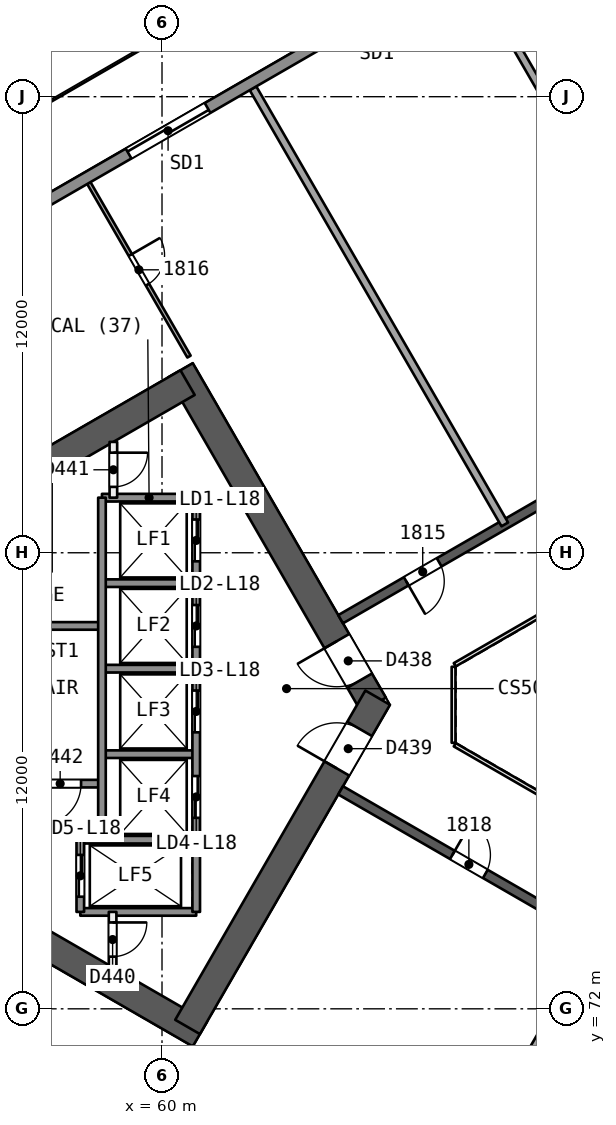
"""IFC4 building model, lengths in metres.
Left out: names, types, materials, properties, quantities, classifications, styles, units other than length and angle.
Written with IfcOpenShell. Run it as: python <this file> out.ifc"""

import sys

from ifc_helpers import new_model, si_unit, direction, frame, frame_2d, origin, place, context, subcontext, project, spatial, rectangle, extrude, element, fill, save


model = new_model("IFC4")
c1 = context("Model", 3, precision=1e-05, world=origin(), true_north=direction((0.0, 1.0)))
c2 = subcontext(c1, "Body", "Model", "MODEL_VIEW")
j1 = project(units=[si_unit("LENGTHUNIT", "METRE"), si_unit("PLANEANGLEUNIT", "RADIAN")], contexts=[c1])
p1 = place(None, origin())
s1 = spatial("IfcSite", under=j1, at=p1, CompositionType="ELEMENT")
p2 = place(p1, origin())
s2 = spatial("IfcBuilding", under=s1, at=p2, CompositionType="ELEMENT")
p3 = place(p2, frame((0.0, 0.0, 79.5)))
s3 = spatial("IfcBuildingStorey", under=s2, at=p3, CompositionType="ELEMENT", Elevation=79.5)
p4 = place(p3, frame((65.567, 80.0, 0.0), z_axis=(0.0, 0.0, 1.0), x_axis=(-0.499988615364, 0.866031976607, 0.0)))
e1 = element("IfcWall", 1, at=p4, inside=s3, PredefinedType="SHEAR", context=c2, shape_type="SweptSolid", body=[
    extrude(rectangle(XDim=10.163, YDim=0.75, at=frame_2d((5.082, 0.0))), origin(), (0.0, 0.0, 1.0), 3.7),
])
p5 = place(p4, frame((0.733, 0.0, 0.0)))
e2 = element("IfcOpeningElement", 2, at=p5, cuts=e1, PredefinedType="OPENING", context=c2, shape_type="SweptSolid", body=[
    extrude(rectangle(XDim=1.2, YDim=2.1, at=frame_2d((0.6, 1.05))), frame((0.0, 0.385, 0.0), z_axis=(0.0, -1.0, 0.0), x_axis=(1.0, 0.0, 0.0)), (0.0, 0.0, 1.0), 0.771),
])
p6 = place(p3, frame((60.673, 88.477, 0.0), z_axis=(0.0, 0.0, 1.0), x_axis=(-0.8660248072, -0.500001033313, 0.0)))
e3 = element("IfcWall", 3, at=p6, inside=s3, PredefinedType="SHEAR", context=c2, shape_type="SweptSolid", body=[
    extrude(rectangle(XDim=13.958, YDim=0.75, at=frame_2d((6.979, 0.0))), origin(), (0.0, 0.0, 1.0), 3.7),
])
p7 = place(p3, frame((48.772, 78.394, 0.0), z_axis=(0.0, 0.0, 1.0), x_axis=(0.866028339916, -0.499994914436, 0.0)))
e4 = element("IfcWall", 4, at=p7, inside=s3, PredefinedType="SHEAR", context=c2, shape_type="SweptSolid", body=[
    extrude(rectangle(XDim=14.117, YDim=0.75, at=frame_2d((7.059, 0.0))), origin(), (0.0, 0.0, 1.0), 3.7),
])
p8 = place(p3, frame((60.673, 71.523, 0.0), z_axis=(0.0, 0.0, 1.0), x_axis=(0.499997052475, 0.866027105532, 0.0)))
e5 = element("IfcWall", 5, at=p8, inside=s3, PredefinedType="SHEAR", context=c2, shape_type="SweptSolid", body=[
    extrude(rectangle(XDim=10.005, YDim=0.75, at=frame_2d((5.002, 0.0))), origin(), (0.0, 0.0, 1.0), 3.7),
])
p9 = place(p8, frame((7.855, 0.0, 0.0)))
e6 = element("IfcOpeningElement", 6, at=p9, cuts=e5, PredefinedType="OPENING", context=c2, shape_type="SweptSolid", body=[
    extrude(rectangle(XDim=1.2, YDim=2.1, at=frame_2d((0.6, 1.05))), frame((0.0, 0.385, 0.0), z_axis=(0.0, -1.0, 0.0), x_axis=(1.0, 0.0, 0.0)), (0.0, 0.0, 1.0), 0.771),
])
p10 = place(p3, frame((78.2, 90.046, 0.0), z_axis=(0.0, 0.0, 1.0), x_axis=(-0.866026492143, -0.499998114903, 0.0)))
e7 = element("IfcWall", 7, at=p10, inside=s3, PredefinedType="SHEAR", context=c2, shape_type="SweptSolid", body=[
    extrude(rectangle(XDim=15.588, YDim=0.25, at=frame_2d((7.794, 0.0))), origin(), (0.0, 0.0, 1.0), 3.2),
])
p11 = place(p10, frame((1.527, 0.0, 0.0)))
e8 = element("IfcOpeningElement", 8, at=p11, cuts=e7, PredefinedType="OPENING", context=c2, shape_type="SweptSolid", body=[
    extrude(rectangle(XDim=1.0, YDim=2.1, at=frame_2d((0.5, 1.05))), frame((0.0, 0.135, 0.0), z_axis=(0.0, -1.0, 0.0), x_axis=(1.0, 0.0, 0.0)), (0.0, 0.0, 1.0), 0.271),
])
p12 = place(p10, frame((8.227, 0.0, 0.0)))
e9 = element("IfcOpeningElement", 9, at=p12, cuts=e7, PredefinedType="OPENING", context=c2, shape_type="SweptSolid", body=[
    extrude(rectangle(XDim=1.1, YDim=2.1, at=frame_2d((0.55, 1.05))), frame((0.0, 0.135, 0.0), z_axis=(0.0, -1.0, 0.0), x_axis=(1.0, 0.0, 0.0)), (0.0, 0.0, 1.0), 0.271),
])
p13 = place(p10, frame((12.594, 0.0, 0.0)))
e10 = element("IfcOpeningElement", 10, at=p13, cuts=e7, PredefinedType="OPENING", context=c2, shape_type="SweptSolid", body=[
    extrude(rectangle(XDim=1.0, YDim=2.1, at=frame_2d((0.5, 1.05))), frame((0.0, 0.135, 0.0), z_axis=(0.0, -1.0, 0.0), x_axis=(1.0, 0.0, 0.0)), (0.0, 0.0, 1.0), 0.271),
])
p14 = place(p3, frame((64.7, 77.748, 0.0), z_axis=(0.0, 0.0, 1.0), x_axis=(0.866026492143, -0.499998114903, 0.0)))
e11 = element("IfcWall", 11, at=p14, inside=s3, PredefinedType="SHEAR", context=c2, shape_type="SweptSolid", body=[
    extrude(rectangle(XDim=15.588, YDim=0.25, at=frame_2d((7.794, 0.0))), origin(), (0.0, 0.0, 1.0), 3.2),
])
p15 = place(p14, frame((3.397, 0.0, 0.0)))
e12 = element("IfcOpeningElement", 12, at=p15, cuts=e11, PredefinedType="OPENING", context=c2, shape_type="SweptSolid", body=[
    extrude(rectangle(XDim=1.0, YDim=2.1, at=frame_2d((0.5, 1.05))), frame((0.0, 0.135, 0.0), z_axis=(0.0, -1.0, 0.0), x_axis=(1.0, 0.0, 0.0)), (0.0, 0.0, 1.0), 0.271),
])
p16 = place(p14, frame((9.091, 0.0, 0.0)))
e13 = element("IfcOpeningElement", 13, at=p16, cuts=e11, PredefinedType="OPENING", context=c2, shape_type="SweptSolid", body=[
    extrude(rectangle(XDim=1.0, YDim=2.1, at=frame_2d((0.5, 1.05))), frame((0.0, 0.135, 0.0), z_axis=(0.0, -1.0, 0.0), x_axis=(1.0, 0.0, 0.0)), (0.0, 0.0, 1.0), 0.271),
])
for number, where, z_axis, x_axis in (
    (14, (68.064, 99.496, 0.0), (0.0, 0.0, 1.0), (0.5, -0.866, 0.0)),
    (15, (62.394, 96.222, 0.0), (0.0, 0.0, 1.0), (0.5, -0.866, 0.0)),
):
    element("IfcWall", number, at=place(p3, frame(where, z_axis=z_axis, x_axis=x_axis)), inside=s3, PredefinedType="PARTITIONING", context=c2, shape_type="SweptSolid", body=[
        extrude(rectangle(XDim=13.252, YDim=0.2, at=frame_2d((6.626, 0.0))), origin(), (0.0, 0.0, 1.0), 3.2),
    ])
p17 = place(p3, frame((58.074, 93.728, 0.0), z_axis=(0.0, 0.0, 1.0), x_axis=(0.499973627007, -0.866040629704, 0.0)))
e16 = element("IfcWall", 16, at=p17, inside=s3, PredefinedType="PARTITIONING", context=c2, shape_type="SweptSolid", body=[
    extrude(rectangle(XDim=5.273, YDim=0.1, at=frame_2d((2.636, 0.0))), origin(), (0.0, 0.0, 1.0), 3.2),
])
p18 = place(p17, frame((2.186, 0.0, 0.0)))
e17 = element("IfcOpeningElement", 17, at=p18, cuts=e16, PredefinedType="OPENING", context=c2, shape_type="SweptSolid", body=[
    extrude(rectangle(XDim=0.9, YDim=2.1, at=frame_2d((0.45, 1.05))), frame((0.0, 0.061, 0.0), z_axis=(0.0, -1.0, 0.0), x_axis=(1.0, 0.0, 0.0)), (0.0, 0.0, 1.0), 0.121),
])
p19 = place(p3, frame((64.824, 62.375, 0.0), z_axis=(0.0, 0.0, 1.0), x_axis=(0.499993034499, 0.866029425281, 0.0)))
e18 = element("IfcWall", 18, at=p19, inside=s3, PredefinedType="PARTITIONING", context=c2, shape_type="SweptSolid", body=[
    extrude(rectangle(XDim=13.252, YDim=0.2, at=frame_2d((6.626, 0.0))), origin(), (0.0, 0.0, 1.0), 3.2),
])
p20 = place(p3, frame((39.223, 83.016, 0.0), z_axis=(0.0, 0.0, 1.0), x_axis=(0.86602468924, 0.500001237625, 0.0)))
e19 = element("IfcWall", 19, at=p20, inside=s3, PredefinedType="SOLIDWALL", context=c2, shape_type="SweptSolid", body=[
    extrude(rectangle(XDim=58.951, YDim=0.3, at=frame_2d((29.476, 0.0))), origin(), (0.0, 0.0, 1.0), 3.2),
])
p21 = place(p20, frame((28.743, 0.0, 0.0)))
e20 = element("IfcOpeningElement", 20, at=p21, cuts=e19, PredefinedType="OPENING", context=c2, shape_type="SweptSolid", body=[
    extrude(rectangle(XDim=2.4, YDim=2.4, at=frame_2d((1.2, 1.2))), frame((0.0, 0.161, 0.0), z_axis=(0.0, -1.0, 0.0), x_axis=(1.0, 0.0, 0.0)), (0.0, 0.0, 1.0), 0.321),
])
p22 = place(p20, frame((34.043, 0.0, 0.0)))
e21 = element("IfcOpeningElement", 21, at=p22, cuts=e19, PredefinedType="OPENING", context=c2, shape_type="SweptSolid", body=[
    extrude(rectangle(XDim=2.4, YDim=2.4, at=frame_2d((1.2, 1.2))), frame((0.0, 0.161, 0.0), z_axis=(0.0, -1.0, 0.0), x_axis=(1.0, 0.0, 0.0)), (0.0, 0.0, 1.0), 0.321),
])
p23 = place(p20, frame((45.739, 0.0, 0.0)))
e22 = element("IfcOpeningElement", 22, at=p23, cuts=e19, PredefinedType="OPENING", context=c2, shape_type="SweptSolid", body=[
    extrude(rectangle(XDim=2.4, YDim=2.4, at=frame_2d((1.2, 1.2))), frame((0.0, 0.161, 0.0), z_axis=(0.0, -1.0, 0.0), x_axis=(1.0, 0.0, 0.0)), (0.0, 0.0, 1.0), 0.321),
])
p24 = place(p20, frame((22.976, 0.0, 0.0)))
e23 = element("IfcOpeningElement", 23, at=p24, cuts=e19, PredefinedType="OPENING", context=c2, shape_type="SweptSolid", body=[
    extrude(rectangle(XDim=2.4, YDim=2.4, at=frame_2d((1.2, 1.2))), frame((0.0, 0.161, 0.0), z_axis=(0.0, -1.0, 0.0), x_axis=(1.0, 0.0, 0.0)), (0.0, 0.0, 1.0), 0.321),
])
p25 = place(p20, frame((10.773, 0.0, 0.0)))
e24 = element("IfcOpeningElement", 24, at=p25, cuts=e19, PredefinedType="OPENING", context=c2, shape_type="SweptSolid", body=[
    extrude(rectangle(XDim=2.4, YDim=2.4, at=frame_2d((1.2, 1.2))), frame((0.0, 0.161, 0.0), z_axis=(0.0, -1.0, 0.0), x_axis=(1.0, 0.0, 0.0)), (0.0, 0.0, 1.0), 0.321),
])
p26 = place(p3, frame((90.276, 47.508, 0.0), z_axis=(0.0, 0.0, 1.0), x_axis=(-0.86602468924, 0.500001237625, 0.0)))
e25 = element("IfcWall", 25, at=p26, inside=s3, PredefinedType="SOLIDWALL", context=c2, shape_type="SweptSolid", body=[
    extrude(rectangle(XDim=58.951, YDim=0.3, at=frame_2d((29.476, 0.0))), origin(), (0.0, 0.0, 1.0), 3.2),
])
p27 = place(p26, frame((32.173, 0.0, 0.0)))
e26 = element("IfcOpeningElement", 26, at=p27, cuts=e25, PredefinedType="OPENING", context=c2, shape_type="SweptSolid", body=[
    extrude(rectangle(XDim=2.4, YDim=2.4, at=frame_2d((1.2, 1.2))), frame((0.0, 0.161, 0.0), z_axis=(0.0, -1.0, 0.0), x_axis=(1.0, 0.0, 0.0)), (0.0, 0.0, 1.0), 0.321),
])
p28 = place(p26, frame((45.739, 0.0, 0.0)))
e27 = element("IfcOpeningElement", 27, at=p28, cuts=e25, PredefinedType="OPENING", context=c2, shape_type="SweptSolid", body=[
    extrude(rectangle(XDim=2.4, YDim=2.4, at=frame_2d((1.2, 1.2))), frame((0.0, 0.161, 0.0), z_axis=(0.0, -1.0, 0.0), x_axis=(1.0, 0.0, 0.0)), (0.0, 0.0, 1.0), 0.321),
])
p29 = place(p26, frame((13.495, 0.0, 0.0)))
e28 = element("IfcOpeningElement", 28, at=p29, cuts=e25, PredefinedType="OPENING", context=c2, shape_type="SweptSolid", body=[
    extrude(rectangle(XDim=2.4, YDim=2.4, at=frame_2d((1.2, 1.2))), frame((0.0, 0.161, 0.0), z_axis=(0.0, -1.0, 0.0), x_axis=(1.0, 0.0, 0.0)), (0.0, 0.0, 1.0), 0.321),
])
for number, where, z_axis, x_axis in (
    (29, (60.9, 85.45, 0.0), (0.0, 0.0, 1.0), (-1.0, 0.0, 0.0)),
    (30, (60.9, 83.2, 0.0), (0.0, 0.0, 1.0), (-1.0, 0.0, 0.0)),
):
    element("IfcWall", number, at=place(p3, frame(where, z_axis=z_axis, x_axis=x_axis)), inside=s3, PredefinedType="SOLIDWALL", context=c2, shape_type="SweptSolid", body=[
        extrude(rectangle(XDim=2.48, YDim=0.2, at=frame_2d((1.24, 0.0))), origin(), (0.0, 0.0, 1.0), 3.2),
    ])
p30 = place(p3, frame((58.42, 82.075, 0.0), z_axis=(0.0, 0.0, 1.0), x_axis=(-1.0, 0.0, 0.0)))
e31 = element("IfcWall", 31, at=p30, inside=s3, PredefinedType="SOLIDWALL", context=c2, shape_type="SweptSolid", body=[
    extrude(rectangle(XDim=7.7, YDim=0.2, at=frame_2d((3.85, 0.0))), origin(), (0.0, 0.0, 1.0), 3.2),
])
for number, where, z_axis, x_axis in (
    (32, (60.9, 80.95, 0.0), (0.0, 0.0, 1.0), (-1.0, 0.0, 0.0)),
    (33, (60.9, 78.7, 0.0), (0.0, 0.0, 1.0), (-1.0, 0.0, 0.0)),
):
    element("IfcWall", number, at=place(p3, frame(where, z_axis=z_axis, x_axis=x_axis)), inside=s3, PredefinedType="SOLIDWALL", context=c2, shape_type="SweptSolid", body=[
        extrude(rectangle(XDim=2.48, YDim=0.2, at=frame_2d((1.24, 0.0))), origin(), (0.0, 0.0, 1.0), 3.2),
    ])
p31 = place(p3, frame((58.42, 77.925, 0.0), z_axis=(0.0, 0.0, 1.0), x_axis=(-1.0, 0.0, 0.0)))
e34 = element("IfcWall", 34, at=p31, inside=s3, PredefinedType="SOLIDWALL", context=c2, shape_type="SweptSolid", body=[
    extrude(rectangle(XDim=7.7, YDim=0.2, at=frame_2d((3.85, 0.0))), origin(), (0.0, 0.0, 1.0), 3.2),
])
p32 = place(p31, frame((0.55, 0.0, 0.0)))
e35 = element("IfcOpeningElement", 35, at=p32, cuts=e34, PredefinedType="OPENING", context=c2, shape_type="SweptSolid", body=[
    extrude(rectangle(XDim=1.1, YDim=2.1, at=frame_2d((0.55, 1.05))), frame((0.0, 0.11, 0.0), z_axis=(0.0, -1.0, 0.0), x_axis=(1.0, 0.0, 0.0)), (0.0, 0.0, 1.0), 0.221),
])
for number, where, z_axis, x_axis in (
    (36, (60.9, 76.45, 0.0), (0.0, 0.0, 1.0), (-1.0, 0.0, 0.0)),
    (37, (60.9, 74.55, 0.0), (0.0, 0.0, 1.0), (-1.0, 0.0, 0.0)),
):
    element("IfcWall", number, at=place(p3, frame(where, z_axis=z_axis, x_axis=x_axis)), inside=s3, PredefinedType="SOLIDWALL", context=c2, shape_type="SweptSolid", body=[
        extrude(rectangle(XDim=3.05, YDim=0.2, at=frame_2d((1.525, 0.0))), origin(), (0.0, 0.0, 1.0), 3.2),
    ])
p33 = place(p3, frame((60.9, 85.45, 0.0), z_axis=(0.0, 0.0, 1.0), x_axis=(0.0, -1.0, 0.0)))
e38 = element("IfcWall", 38, at=p33, inside=s3, PredefinedType="SOLIDWALL", context=c2, shape_type="SweptSolid", body=[
    extrude(rectangle(XDim=10.9, YDim=0.2, at=frame_2d((5.45, 0.0))), origin(), (0.0, 0.0, 1.0), 3.2),
])
p34 = place(p33, frame((0.575, 0.0, 0.0)))
e39 = element("IfcOpeningElement", 39, at=p34, cuts=e38, PredefinedType="OPENING", context=c2, shape_type="SweptSolid", body=[
    extrude(rectangle(XDim=1.1, YDim=2.1, at=frame_2d((0.55, 1.05))), frame((0.0, 0.11, 0.0), z_axis=(0.0, -1.0, 0.0), x_axis=(1.0, 0.0, 0.0)), (0.0, 0.0, 1.0), 0.221),
])
p35 = place(p33, frame((2.825, 0.0, 0.0)))
e40 = element("IfcOpeningElement", 40, at=p35, cuts=e38, PredefinedType="OPENING", context=c2, shape_type="SweptSolid", body=[
    extrude(rectangle(XDim=1.1, YDim=2.1, at=frame_2d((0.55, 1.05))), frame((0.0, 0.11, 0.0), z_axis=(0.0, -1.0, 0.0), x_axis=(1.0, 0.0, 0.0)), (0.0, 0.0, 1.0), 0.221),
])
p36 = place(p33, frame((5.075, 0.0, 0.0)))
e41 = element("IfcOpeningElement", 41, at=p36, cuts=e38, PredefinedType="OPENING", context=c2, shape_type="SweptSolid", body=[
    extrude(rectangle(XDim=1.1, YDim=2.1, at=frame_2d((0.55, 1.05))), frame((0.0, 0.11, 0.0), z_axis=(0.0, -1.0, 0.0), x_axis=(1.0, 0.0, 0.0)), (0.0, 0.0, 1.0), 0.221),
])
p37 = place(p33, frame((7.325, 0.0, 0.0)))
e42 = element("IfcOpeningElement", 42, at=p37, cuts=e38, PredefinedType="OPENING", context=c2, shape_type="SweptSolid", body=[
    extrude(rectangle(XDim=1.1, YDim=2.1, at=frame_2d((0.55, 1.05))), frame((0.0, 0.11, 0.0), z_axis=(0.0, -1.0, 0.0), x_axis=(1.0, 0.0, 0.0)), (0.0, 0.0, 1.0), 0.221),
])
p38 = place(p3, frame((58.72, 86.917, 0.0), z_axis=(0.0, 0.0, 1.0), x_axis=(0.0, -1.0, 0.0)))
e43 = element("IfcWall", 43, at=p38, inside=s3, PredefinedType="PARTITIONING", context=c2, shape_type="SweptSolid", body=[
    extrude(rectangle(XDim=1.467, YDim=0.2, at=frame_2d((0.733, 0.0))), origin(), (0.0, 0.0, 1.0), 3.2),
])
p39 = place(p38, frame((0.283, 0.0, 0.0)))
e44 = element("IfcOpeningElement", 44, at=p39, cuts=e43, PredefinedType="OPENING", context=c2, shape_type="SweptSolid", body=[
    extrude(rectangle(XDim=0.9, YDim=2.1, at=frame_2d((0.45, 1.05))), frame((0.0, 0.11, 0.0), z_axis=(0.0, -1.0, 0.0), x_axis=(1.0, 0.0, 0.0)), (0.0, 0.0, 1.0), 0.221),
])
p40 = place(p3, frame((58.7, 74.55, 0.0), z_axis=(0.0, 0.0, 1.0), x_axis=(0.0, -1.0, 0.0)))
e45 = element("IfcWall", 45, at=p40, inside=s3, PredefinedType="PARTITIONING", context=c2, shape_type="SweptSolid", body=[
    extrude(rectangle(XDim=1.455, YDim=0.2, at=frame_2d((0.728, 0.0))), origin(), (0.0, 0.0, 1.0), 3.2),
])
p41 = place(p40, frame((0.278, 0.0, 0.0)))
e46 = element("IfcOpeningElement", 46, at=p41, cuts=e45, PredefinedType="OPENING", context=c2, shape_type="SweptSolid", body=[
    extrude(rectangle(XDim=0.9, YDim=2.1, at=frame_2d((0.45, 1.05))), frame((0.0, 0.11, 0.0), z_axis=(0.0, -1.0, 0.0), x_axis=(1.0, 0.0, 0.0)), (0.0, 0.0, 1.0), 0.221),
])
p42 = place(p3, frame((58.42, 85.45, 0.0), z_axis=(0.0, 0.0, 1.0), x_axis=(0.0, -1.0, 0.0)))
e47 = element("IfcWall", 47, at=p42, inside=s3, PredefinedType="SOLIDWALL", context=c2, shape_type="SweptSolid", body=[
    extrude(rectangle(XDim=9.0, YDim=0.2, at=frame_2d((4.5, 0.0))), origin(), (0.0, 0.0, 1.0), 3.2),
])
p43 = place(p3, frame((57.85, 76.45, 0.0), z_axis=(0.0, 0.0, 1.0), x_axis=(0.0, -1.0, 0.0)))
e48 = element("IfcWall", 48, at=p43, inside=s3, PredefinedType="SOLIDWALL", context=c2, shape_type="SweptSolid", body=[
    extrude(rectangle(XDim=1.9, YDim=0.2, at=frame_2d((0.95, 0.0))), origin(), (0.0, 0.0, 1.0), 3.2),
])
p44 = place(p43, frame((0.4, 0.0, 0.0)))
e49 = element("IfcOpeningElement", 49, at=p44, cuts=e48, PredefinedType="OPENING", context=c2, shape_type="SweptSolid", body=[
    extrude(rectangle(XDim=1.1, YDim=2.1, at=frame_2d((0.55, 1.05))), frame((0.0, 0.11, 0.0), z_axis=(0.0, -1.0, 0.0), x_axis=(1.0, 0.0, 0.0)), (0.0, 0.0, 1.0), 0.221),
])
p45 = place(p3, frame((77.738, 86.846, 0.0), z_axis=(0.0, 0.0, 1.0), x_axis=(-0.866026658274, -0.499997827154, 0.0)))
e50 = element("IfcWall", 50, at=p45, inside=s3, PredefinedType="PARTITIONING", context=c2, shape_type="SweptSolid", body=[
    extrude(rectangle(XDim=11.588, YDim=0.1, at=frame_2d((5.794, 0.0))), origin(), (0.0, 0.0, 1.0), 3.2),
])
p46 = place(p3, frame((67.672, 81.0, 0.0), z_axis=(0.0, 0.0, 1.0), x_axis=(0.0, -1.0, 0.0)))
e51 = element("IfcWall", 51, at=p46, inside=s3, PredefinedType="PARTITIONING", context=c2, shape_type="SweptSolid", body=[
    extrude(rectangle(XDim=2.0, YDim=0.1, at=frame_2d((1.0, 0.0))), origin(), (0.0, 0.0, 1.0), 3.2),
])
p47 = place(p3, frame((67.702, 78.948, 0.0), z_axis=(0.0, 0.0, 1.0), x_axis=(0.866026658274, -0.499997827154, 0.0)))
e52 = element("IfcWall", 52, at=p47, inside=s3, PredefinedType="PARTITIONING", context=c2, shape_type="SweptSolid", body=[
    extrude(rectangle(XDim=11.588, YDim=0.1, at=frame_2d((5.794, 0.0))), origin(), (0.0, 0.0, 1.0), 3.2),
])
p48 = place(p13, origin())
e53 = element("IfcDoor", 53, at=p48, inside=s3, OperationType="SINGLE_SWING_RIGHT", PredefinedType="NOTDEFINED", context=c2, shape_type="SweptSolid", body=[
    extrude(rectangle(XDim=1.0, YDim=2.1, at=frame_2d((0.5, 1.05))), frame((0.0, 0.025, 0.0), z_axis=(0.0, -1.0, 0.0), x_axis=(1.0, 0.0, 0.0)), (0.0, 0.0, 1.0), 0.05),
])
fill(e10, e53)
p49 = place(p18, origin())
e54 = element("IfcDoor", 54, at=p49, inside=s3, OperationType="SINGLE_SWING_LEFT", PredefinedType="NOTDEFINED", context=c2, shape_type="SweptSolid", body=[
    extrude(rectangle(XDim=0.9, YDim=2.1, at=frame_2d((0.45, 1.05))), frame((0.0, 0.025, 0.0), z_axis=(0.0, -1.0, 0.0), x_axis=(1.0, 0.0, 0.0)), (0.0, 0.0, 1.0), 0.05),
])
fill(e17, e54)
p50 = place(p15, origin())
e55 = element("IfcDoor", 55, at=p50, inside=s3, OperationType="SINGLE_SWING_LEFT", PredefinedType="NOTDEFINED", context=c2, shape_type="SweptSolid", body=[
    extrude(rectangle(XDim=1.0, YDim=2.1, at=frame_2d((0.5, 1.05))), frame((0.0, 0.025, 0.0), z_axis=(0.0, -1.0, 0.0), x_axis=(1.0, 0.0, 0.0)), (0.0, 0.0, 1.0), 0.05),
])
fill(e12, e55)
p51 = place(p24, origin())
e56 = element("IfcDoor", 56, at=p51, inside=s3, OperationType="SLIDING_TO_RIGHT", PredefinedType="NOTDEFINED", context=c2, shape_type="SweptSolid", body=[
    extrude(rectangle(XDim=2.4, YDim=2.4, at=frame_2d((1.2, 1.2))), frame((0.0, 0.025, 0.0), z_axis=(0.0, -1.0, 0.0), x_axis=(1.0, 0.0, 0.0)), (0.0, 0.0, 1.0), 0.05),
])
fill(e23, e56)
p52 = place(p5, origin())
e57 = element("IfcDoor", 57, at=p52, inside=s3, OperationType="SINGLE_SWING_RIGHT", PredefinedType="NOTDEFINED", context=c2, shape_type="SweptSolid", body=[
    extrude(rectangle(XDim=1.2, YDim=2.1, at=frame_2d((0.6, 1.05))), frame((0.0, 0.025, 0.0), z_axis=(0.0, -1.0, 0.0), x_axis=(1.0, 0.0, 0.0)), (0.0, 0.0, 1.0), 0.05),
])
fill(e2, e57)
p53 = place(p9, origin())
e58 = element("IfcDoor", 58, at=p53, inside=s3, OperationType="SINGLE_SWING_LEFT", PredefinedType="NOTDEFINED", context=c2, shape_type="SweptSolid", body=[
    extrude(rectangle(XDim=1.2, YDim=2.1, at=frame_2d((0.6, 1.05))), frame((0.0, 0.025, 0.0), z_axis=(0.0, -1.0, 0.0), x_axis=(1.0, 0.0, 0.0)), (0.0, 0.0, 1.0), 0.05),
])
fill(e6, e58)
p54 = place(p34, origin())
e59 = element("IfcDoor", 59, at=p54, inside=s3, OperationType="SLIDING_TO_RIGHT", PredefinedType="NOTDEFINED", context=c2, shape_type="SweptSolid", body=[
    extrude(rectangle(XDim=1.1, YDim=2.1, at=frame_2d((0.55, 1.05))), frame((0.0, 0.025, 0.0), z_axis=(0.0, -1.0, 0.0), x_axis=(1.0, 0.0, 0.0)), (0.0, 0.0, 1.0), 0.05),
])
fill(e39, e59)
p55 = place(p35, origin())
e60 = element("IfcDoor", 60, at=p55, inside=s3, OperationType="SLIDING_TO_LEFT", PredefinedType="NOTDEFINED", context=c2, shape_type="SweptSolid", body=[
    extrude(rectangle(XDim=1.1, YDim=2.1, at=frame_2d((0.55, 1.05))), frame((0.0, 0.025, 0.0), z_axis=(0.0, -1.0, 0.0), x_axis=(1.0, 0.0, 0.0)), (0.0, 0.0, 1.0), 0.05),
])
fill(e40, e60)
p56 = place(p36, origin())
e61 = element("IfcDoor", 61, at=p56, inside=s3, OperationType="SLIDING_TO_RIGHT", PredefinedType="NOTDEFINED", context=c2, shape_type="SweptSolid", body=[
    extrude(rectangle(XDim=1.1, YDim=2.1, at=frame_2d((0.55, 1.05))), frame((0.0, 0.025, 0.0), z_axis=(0.0, -1.0, 0.0), x_axis=(1.0, 0.0, 0.0)), (0.0, 0.0, 1.0), 0.05),
])
fill(e41, e61)
p57 = place(p37, origin())
e62 = element("IfcDoor", 62, at=p57, inside=s3, OperationType="SLIDING_TO_LEFT", PredefinedType="NOTDEFINED", context=c2, shape_type="SweptSolid", body=[
    extrude(rectangle(XDim=1.1, YDim=2.1, at=frame_2d((0.55, 1.05))), frame((0.0, 0.025, 0.0), z_axis=(0.0, -1.0, 0.0), x_axis=(1.0, 0.0, 0.0)), (0.0, 0.0, 1.0), 0.05),
])
fill(e42, e62)
p58 = place(p44, origin())
e63 = element("IfcDoor", 63, at=p58, inside=s3, OperationType="SLIDING_TO_RIGHT", PredefinedType="NOTDEFINED", context=c2, shape_type="SweptSolid", body=[
    extrude(rectangle(XDim=1.1, YDim=2.1, at=frame_2d((0.55, 1.05))), frame((0.0, 0.025, 0.0), z_axis=(0.0, -1.0, 0.0), x_axis=(1.0, 0.0, 0.0)), (0.0, 0.0, 1.0), 0.05),
])
fill(e49, e63)
p59 = place(p41, origin())
e64 = element("IfcDoor", 64, at=p59, inside=s3, OperationType="SINGLE_SWING_LEFT", PredefinedType="NOTDEFINED", context=c2, shape_type="SweptSolid", body=[
    extrude(rectangle(XDim=0.9, YDim=2.1, at=frame_2d((0.45, 1.05))), frame((0.0, 0.025, 0.0), z_axis=(0.0, -1.0, 0.0), x_axis=(1.0, 0.0, 0.0)), (0.0, 0.0, 1.0), 0.05),
])
fill(e46, e64)
p60 = place(p39, origin())
e65 = element("IfcDoor", 65, at=p60, inside=s3, OperationType="SINGLE_SWING_LEFT", PredefinedType="NOTDEFINED", context=c2, shape_type="SweptSolid", body=[
    extrude(rectangle(XDim=0.9, YDim=2.1, at=frame_2d((0.45, 1.05))), frame((0.0, 0.025, 0.0), z_axis=(0.0, -1.0, 0.0), x_axis=(1.0, 0.0, 0.0)), (0.0, 0.0, 1.0), 0.05),
])
fill(e44, e65)
p61 = place(p32, origin())
e66 = element("IfcDoor", 66, at=p61, inside=s3, OperationType="SINGLE_SWING_RIGHT", PredefinedType="NOTDEFINED", context=c2, shape_type="SweptSolid", body=[
    extrude(rectangle(XDim=1.1, YDim=2.1, at=frame_2d((0.55, 1.05))), frame((0.0, 0.025, 0.0), z_axis=(0.0, -1.0, 0.0), x_axis=(1.0, 0.0, 0.0)), (0.0, 0.0, 1.0), 0.05),
])
fill(e35, e66)
save(model, sys.argv[1])
